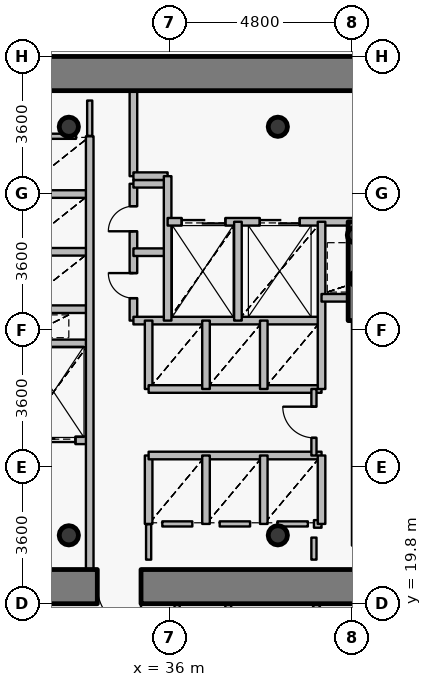
"""IFC4 building model, lengths in metres.
Left out: names, types, materials, properties, quantities, classifications, styles, units other than length and angle.
Written with IfcOpenShell. Run it as: python <this file> out.ifc"""

import sys

from ifc_helpers import new_model, si_unit, direction, frame, frame_2d, origin, origin_2d, place, context, subcontext, project, spatial, rectangle, hollow_circle, extrude, source, transform, mapped, element, fill, save


model = new_model("IFC4")
c1 = context("Model", 3, precision=1e-05, world=origin(), true_north=direction((0.0, 1.0)))
c2 = subcontext(c1, "Body", "Model", "MODEL_VIEW")
j1 = project(units=[si_unit("LENGTHUNIT", "METRE"), si_unit("PLANEANGLEUNIT", "RADIAN")], contexts=[c1])
p1 = place(None, origin())
s1 = spatial("IfcSite", under=j1, at=p1, CompositionType="ELEMENT")
p2 = place(p1, origin())
s2 = spatial("IfcBuilding", under=s1, at=p2, CompositionType="ELEMENT")
p3 = place(p2, frame((0.0, 0.0, 18.6)))
s3 = spatial("IfcBuildingStorey", under=s2, at=p3, CompositionType="ELEMENT", Elevation=18.6)
for number, where, z_axis, x_axis in (
    (1, (33.35, 21.6, 0.0), (0.0, 0.0, 1.0), (1.0, 0.0, 0.0)),
    (2, (38.85, 21.6, 0.0), (0.0, 0.0, 1.0), (1.0, 0.0, 0.0)),
    (3, (38.85, 32.35, 0.0), (0.0, 0.0, 1.0), (1.0, 0.0, 0.0)),
    (4, (33.35, 32.35, 0.0), (0.0, 0.0, 1.0), (1.0, 0.0, 0.0)),
):
    element("IfcColumn", number, at=place(p3, frame(where, z_axis=z_axis, x_axis=x_axis)), inside=s3, PredefinedType="COLUMN", context=c2, shape_type="SweptSolid", body=[
        extrude(hollow_circle(Radius=0.254, WallThickness=0.02, at=origin_2d()), origin(), (0.0, 0.0, 1.0), 4.2),
    ])
for number, where, z_axis, x_axis in (
    (5, (40.95, 28.35, 0.0), (0.0, 0.0, 1.0), (1.0, 0.0, 0.0)),
    (6, (40.88, 29.5, 0.0), (0.0, 0.0, 1.0), (1.0, 0.0, 0.0)),
):
    element("IfcColumn", number, at=place(p3, frame(where, z_axis=z_axis, x_axis=x_axis)), inside=s3, PredefinedType="COLUMN", context=c2, shape_type="SweptSolid", body=[
        extrude(hollow_circle(Radius=0.203, WallThickness=0.016, at=origin_2d()), origin(), (0.0, 0.0, 1.0), 4.2),
    ])
p4 = place(p3, frame((26.75, 33.75, 0.0), z_axis=(0.0, 0.0, 1.0), x_axis=(1.0, 0.0, 0.0)))
e7 = element("IfcWall", 7, at=p4, inside=s3, PredefinedType="SHEAR", context=c2, shape_type="SweptSolid", body=[
    extrude(rectangle(XDim=18.5, YDim=0.9, at=frame_2d((9.25, 0.0))), origin(), (0.0, 0.0, 1.0), 3.35),
])
p5 = place(p3, frame((45.25, 20.25, 0.0), z_axis=(0.0, 0.0, 1.0), x_axis=(-1.0, 0.0, 0.0)))
e8 = element("IfcWall", 8, at=p5, inside=s3, PredefinedType="SHEAR", context=c2, shape_type="SweptSolid", body=[
    extrude(rectangle(XDim=18.5, YDim=0.9, at=frame_2d((9.25, 0.0))), origin(), (0.0, 0.0, 1.0), 3.35),
])
p6 = place(p5, frame((10.0, 0.0, 0.0)))
e9 = element("IfcOpeningElement", 9, at=p6, cuts=e8, PredefinedType="OPENING", context=c2, shape_type="SweptSolid", body=[
    extrude(rectangle(XDim=1.15, YDim=2.15, at=origin_2d()), frame((0.575, 0.46, 1.075), z_axis=(0.0, -1.0, 0.0), x_axis=(1.0, 0.0, 0.0)), (0.0, 0.0, 1.0), 0.92),
])
p7 = place(p3, frame((40.9, 27.25, 0.0), z_axis=(0.0, 0.0, 1.0), x_axis=(0.0, 1.0, 0.0)))
e10 = element("IfcWall", 10, at=p7, inside=s3, PredefinedType="SHEAR", context=c2, shape_type="SweptSolid", body=[
    extrude(rectangle(XDim=2.6, YDim=0.4, at=frame_2d((1.3, 0.0))), origin(), (0.0, 0.0, 1.0), 3.5),
])
p8 = place(p3, frame((32.0, 24.1, 0.0), z_axis=(0.0, 0.0, 1.0), x_axis=(1.0, 0.0, 0.0)))
e11 = element("IfcWall", 11, at=p8, inside=s3, PredefinedType="PARTITIONING", context=c2, shape_type="SweptSolid", body=[
    extrude(rectangle(XDim=1.9, YDim=0.2, at=frame_2d((0.95, 0.0))), origin(), (0.0, 0.0, 1.0), 3.485),
])
p9 = place(p8, frame((0.375, 0.0, 0.0)))
e12 = element("IfcOpeningElement", 12, at=p9, cuts=e11, PredefinedType="OPENING", context=c2, shape_type="SweptSolid", body=[
    extrude(rectangle(XDim=1.15, YDim=2.15, at=origin_2d()), frame((0.575, 0.11, 1.075), z_axis=(0.0, -1.0, 0.0), x_axis=(1.0, 0.0, 0.0)), (0.0, 0.0, 1.0), 0.22),
])
for number, where, z_axis, x_axis in (
    (13, (32.0, 26.65, 0.0), (0.0, 0.0, 1.0), (1.0, 0.0, 0.0)),
    (14, (32.0, 27.55, 0.0), (0.0, 0.0, 1.0), (1.0, 0.0, 0.0)),
    (15, (32.0, 29.06, 0.0), (0.0, 0.0, 1.0), (1.0, 0.0, 0.0)),
    (16, (32.0, 30.58, 0.0), (0.0, 0.0, 1.0), (1.0, 0.0, 0.0)),
):
    element("IfcWall", number, at=place(p3, frame(where, z_axis=z_axis, x_axis=x_axis)), inside=s3, PredefinedType="PARTITIONING", context=c2, shape_type="SweptSolid", body=[
        extrude(rectangle(XDim=1.9, YDim=0.2, at=frame_2d((0.95, 0.0))), origin(), (0.0, 0.0, 1.0), 3.485),
    ])
p10 = place(p3, frame((33.9, 20.7, 0.0), z_axis=(0.0, 0.0, 1.0), x_axis=(0.0, 1.0, 0.0)))
e17 = element("IfcWall", 17, at=p10, inside=s3, PredefinedType="PARTITIONING", context=c2, shape_type="SweptSolid", body=[
    extrude(rectangle(XDim=11.4, YDim=0.2, at=frame_2d((5.7, 0.0))), origin(), (0.0, 0.0, 1.0), 3.485),
])
p11 = place(p3, frame((35.05, 27.25, 0.0), z_axis=(0.0, 0.0, 1.0), x_axis=(0.0, 1.0, 0.0)))
e18 = element("IfcWall", 18, at=p11, inside=s3, PredefinedType="PARTITIONING", context=c2, shape_type="SweptSolid", body=[
    extrude(rectangle(XDim=3.6, YDim=0.2, at=frame_2d((1.8, 0.0))), origin(), (0.0, 0.0, 1.0), 3.9),
])
p12 = place(p11, frame((0.59, 0.0, 0.0)))
e19 = element("IfcOpeningElement", 19, at=p12, cuts=e18, PredefinedType="OPENING", context=c2, shape_type="SweptSolid", body=[
    extrude(rectangle(XDim=0.66, YDim=2.05, at=origin_2d()), frame((0.33, 0.11, 1.025), z_axis=(0.0, -1.0, 0.0), x_axis=(1.0, 0.0, 0.0)), (0.0, 0.0, 1.0), 0.22),
])
p13 = place(p11, frame((2.35, 0.0, 0.0)))
e20 = element("IfcOpeningElement", 20, at=p13, cuts=e18, PredefinedType="OPENING", context=c2, shape_type="SweptSolid", body=[
    extrude(rectangle(XDim=0.66, YDim=2.05, at=origin_2d()), frame((0.33, 0.11, 1.025), z_axis=(0.0, -1.0, 0.0), x_axis=(1.0, 0.0, 0.0)), (0.0, 0.0, 1.0), 0.22),
])
p14 = place(p3, frame((35.05, 27.25, 0.0), z_axis=(0.0, 0.0, 1.0), x_axis=(1.0, 0.0, 0.0)))
e21 = element("IfcWall", 21, at=p14, inside=s3, PredefinedType="PARTITIONING", context=c2, shape_type="SweptSolid", body=[
    extrude(rectangle(XDim=4.95, YDim=0.2, at=frame_2d((2.475, 0.0))), origin(), (0.0, 0.0, 1.0), 3.485),
])
for number, where, z_axis, x_axis in (
    (22, (35.05, 29.05, 0.0), (0.0, 0.0, 1.0), (1.0, 0.0, 0.0)),
    (23, (35.05, 30.85, 0.0), (0.0, 0.0, 1.0), (1.0, 0.0, 0.0)),
):
    element("IfcWall", number, at=place(p3, frame(where, z_axis=z_axis, x_axis=x_axis)), inside=s3, PredefinedType="PARTITIONING", context=c2, shape_type="SweptSolid", body=[
        extrude(rectangle(XDim=0.9, YDim=0.2, at=frame_2d((0.45, 0.0))), origin(), (0.0, 0.0, 1.0), 3.9),
    ])
p15 = place(p3, frame((35.05, 31.05, 0.0), z_axis=(0.0, 0.0, 1.0), x_axis=(0.0, 1.0, 0.0)))
e24 = element("IfcWall", 24, at=p15, inside=s3, PredefinedType="PARTITIONING", context=c2, shape_type="SweptSolid", body=[
    extrude(rectangle(XDim=2.25, YDim=0.2, at=frame_2d((1.125, 0.0))), origin(), (0.0, 0.0, 1.0), 3.485),
])
p16 = place(p3, frame((35.05, 31.05, 0.0), z_axis=(0.0, 0.0, 1.0), x_axis=(1.0, 0.0, 0.0)))
e25 = element("IfcWall", 25, at=p16, inside=s3, PredefinedType="PARTITIONING", context=c2, shape_type="SweptSolid", body=[
    extrude(rectangle(XDim=0.9, YDim=0.2, at=frame_2d((0.45, 0.0))), origin(), (0.0, 0.0, 1.0), 3.9),
])
p17 = place(p3, frame((35.45, 21.9, 0.0), z_axis=(0.0, 0.0, 1.0), x_axis=(0.0, 1.0, 0.0)))
e26 = element("IfcWall", 26, at=p17, inside=s3, PredefinedType="PARTITIONING", context=c2, shape_type="SweptSolid", body=[
    extrude(rectangle(XDim=1.8, YDim=0.2, at=frame_2d((0.9, 0.0))), origin(), (0.0, 0.0, 1.0), 3.9),
])
p18 = place(p3, frame((35.45, 23.7, 0.0), z_axis=(0.0, 0.0, 1.0), x_axis=(1.0, 0.0, 0.0)))
e27 = element("IfcWall", 27, at=p18, inside=s3, PredefinedType="PARTITIONING", context=c2, shape_type="SweptSolid", body=[
    extrude(rectangle(XDim=4.55, YDim=0.2, at=frame_2d((2.275, 0.0))), origin(), (0.0, 0.0, 1.0), 3.485),
])
p19 = place(p3, frame((35.45, 25.45, 0.0), z_axis=(0.0, 0.0, 1.0), x_axis=(0.0, 1.0, 0.0)))
e28 = element("IfcWall", 28, at=p19, inside=s3, PredefinedType="PARTITIONING", context=c2, shape_type="SweptSolid", body=[
    extrude(rectangle(XDim=1.8, YDim=0.2, at=frame_2d((0.9, 0.0))), origin(), (0.0, 0.0, 1.0), 3.9),
])
p20 = place(p3, frame((35.45, 25.45, 0.0), z_axis=(0.0, 0.0, 1.0), x_axis=(1.0, 0.0, 0.0)))
e29 = element("IfcWall", 29, at=p20, inside=s3, PredefinedType="PARTITIONING", context=c2, shape_type="SweptSolid", body=[
    extrude(rectangle(XDim=4.55, YDim=0.2, at=frame_2d((2.275, 0.0))), origin(), (0.0, 0.0, 1.0), 3.485),
])
p21 = place(p3, frame((35.95, 27.25, 0.0), z_axis=(0.0, 0.0, 1.0), x_axis=(0.0, 1.0, 0.0)))
e30 = element("IfcWall", 30, at=p21, inside=s3, PredefinedType="PARTITIONING", context=c2, shape_type="SweptSolid", body=[
    extrude(rectangle(XDim=3.8, YDim=0.2, at=frame_2d((1.9, 0.0))), origin(), (0.0, 0.0, 1.0), 3.9),
])
p22 = place(p3, frame((35.95, 29.85, 0.0), z_axis=(0.0, 0.0, 1.0), x_axis=(1.0, 0.0, 0.0)))
e31 = element("IfcWall", 31, at=p22, inside=s3, PredefinedType="PARTITIONING", context=c2, shape_type="SweptSolid", body=[
    extrude(rectangle(XDim=8.49, YDim=0.2, at=frame_2d((4.245, 0.0))), origin(), (0.0, 0.0, 1.0), 3.485),
])
p23 = place(p22, frame((6.1, 0.0, 0.0)))
e32 = element("IfcOpeningElement", 32, at=p23, cuts=e31, PredefinedType="OPENING", context=c2, shape_type="SweptSolid", body=[
    extrude(rectangle(XDim=1.2, YDim=2.15, at=origin_2d()), frame((0.6, 0.11, 1.075), z_axis=(0.0, -1.0, 0.0), x_axis=(1.0, 0.0, 0.0)), (0.0, 0.0, 1.0), 0.22),
])
p24 = place(p22, frame((0.37, 0.0, 0.0)))
e33 = element("IfcOpeningElement", 33, at=p24, cuts=e31, PredefinedType="OPENING", context=c2, shape_type="SweptSolid", body=[
    extrude(rectangle(XDim=1.15, YDim=2.15, at=origin_2d()), frame((0.575, 0.11, 1.075), z_axis=(0.0, -1.0, 0.0), x_axis=(1.0, 0.0, 0.0)), (0.0, 0.0, 1.0), 0.22),
])
p25 = place(p22, frame((2.425, 0.0, 0.0)))
e34 = element("IfcOpeningElement", 34, at=p25, cuts=e31, PredefinedType="OPENING", context=c2, shape_type="SweptSolid", body=[
    extrude(rectangle(XDim=1.05, YDim=2.15, at=origin_2d()), frame((0.525, 0.11, 1.075), z_axis=(0.0, -1.0, 0.0), x_axis=(1.0, 0.0, 0.0)), (0.0, 0.0, 1.0), 0.22),
])
p26 = place(p3, frame((36.2, 17.9, 0.0), z_axis=(0.0, 0.0, 1.0), x_axis=(0.0, 1.0, 0.0)))
e35 = element("IfcWall", 35, at=p26, inside=s3, PredefinedType="PARTITIONING", context=c2, shape_type="SweptSolid", body=[
    extrude(rectangle(XDim=1.9, YDim=0.135, at=frame_2d((0.95, 0.0))), origin(), (0.0, 0.0, 1.0), 3.085),
])
p27 = place(p26, frame((0.425, 0.0, 0.0)))
e36 = element("IfcOpeningElement", 36, at=p27, cuts=e35, PredefinedType="OPENING", context=c2, shape_type="SweptSolid", body=[
    extrude(rectangle(XDim=1.05, YDim=2.15, at=origin_2d()), frame((0.525, 0.078, 1.075), z_axis=(0.0, -1.0, 0.0), x_axis=(1.0, 0.0, 0.0)), (0.0, 0.0, 1.0), 0.155),
])
for number, where, z_axis, x_axis in (
    (37, (36.96, 21.9, 0.0), (0.0, 0.0, 1.0), (0.0, 1.0, 0.0)),
    (38, (36.96, 25.45, 0.0), (0.0, 0.0, 1.0), (0.0, 1.0, 0.0)),
):
    element("IfcWall", number, at=place(p3, frame(where, z_axis=z_axis, x_axis=x_axis)), inside=s3, PredefinedType="PARTITIONING", context=c2, shape_type="SweptSolid", body=[
        extrude(rectangle(XDim=1.8, YDim=0.2, at=frame_2d((0.9, 0.0))), origin(), (0.0, 0.0, 1.0), 3.9),
    ])
p28 = place(p3, frame((37.531, 19.8, 0.0), z_axis=(0.0, 0.0, 1.0), x_axis=(0.207904603096, -0.978149107249, 0.0)))
e39 = element("IfcWall", 39, at=p28, inside=s3, PredefinedType="PARTITIONING", context=c2, shape_type="SweptSolid", body=[
    extrude(rectangle(XDim=18.724, YDim=0.15, at=frame_2d((9.362, 0.0))), origin(), (0.0, 0.0, 1.0), 3.285),
])
p29 = place(p28, frame((8.837, 0.0, 0.0)))
e40 = element("IfcOpeningElement", 40, at=p29, cuts=e39, PredefinedType="OPENING", context=c2, shape_type="SweptSolid", body=[
    extrude(rectangle(XDim=1.05, YDim=2.15, at=origin_2d()), frame((0.525, 0.085, 1.075), z_axis=(0.0, -1.0, 0.0), x_axis=(1.0, 0.0, 0.0)), (0.0, 0.0, 1.0), 0.17),
])
p30 = place(p3, frame((37.8, 27.25, 0.0), z_axis=(0.0, 0.0, 1.0), x_axis=(0.0, 1.0, 0.0)))
e41 = element("IfcWall", 41, at=p30, inside=s3, PredefinedType="PARTITIONING", context=c2, shape_type="SweptSolid", body=[
    extrude(rectangle(XDim=2.6, YDim=0.2, at=frame_2d((1.3, 0.0))), origin(), (0.0, 0.0, 1.0), 3.9),
])
for number, where, z_axis, x_axis in (
    (42, (38.48, 21.9, 0.0), (0.0, 0.0, 1.0), (0.0, 1.0, 0.0)),
    (43, (38.48, 25.45, 0.0), (0.0, 0.0, 1.0), (0.0, 1.0, 0.0)),
):
    element("IfcWall", number, at=place(p3, frame(where, z_axis=z_axis, x_axis=x_axis)), inside=s3, PredefinedType="PARTITIONING", context=c2, shape_type="SweptSolid", body=[
        extrude(rectangle(XDim=1.8, YDim=0.2, at=frame_2d((0.9, 0.0))), origin(), (0.0, 0.0, 1.0), 3.9),
    ])
p31 = place(p3, frame((39.8, 21.9, 0.0), z_axis=(0.0, 0.0, 1.0), x_axis=(1.0, 0.0, 0.0)))
e44 = element("IfcWall", 44, at=p31, inside=s3, PredefinedType="PARTITIONING", context=c2, shape_type="SweptSolid", body=[
    extrude(rectangle(XDim=0.2, YDim=0.2, at=frame_2d((0.1, 0.0))), origin(), (0.0, 0.0, 1.0), 3.9),
])
p32 = place(p3, frame((39.8, 23.7, 0.0), z_axis=(0.0, 0.0, 1.0), x_axis=(0.0, 1.0, 0.0)))
e45 = element("IfcWall", 45, at=p32, inside=s3, PredefinedType="PARTITIONING", context=c2, shape_type="SweptSolid", body=[
    extrude(rectangle(XDim=1.75, YDim=0.135, at=frame_2d((0.875, 0.0))), origin(), (0.0, 0.0, 1.0), 3.9),
])
p33 = place(p32, frame((0.465, 0.0, 0.0)))
e46 = element("IfcOpeningElement", 46, at=p33, cuts=e45, PredefinedType="OPENING", context=c2, shape_type="SweptSolid", body=[
    extrude(rectangle(XDim=0.82, YDim=2.1, at=origin_2d()), frame((0.41, 0.078, 1.05), z_axis=(0.0, -1.0, 0.0), x_axis=(1.0, 0.0, 0.0)), (0.0, 0.0, 1.0), 0.155),
])
p34 = place(p3, frame((39.828, 19.8, 0.0), z_axis=(0.0, 0.0, 1.0), x_axis=(0.469463695446, -0.882951775953, 0.0)))
e47 = element("IfcWall", 47, at=p34, inside=s3, PredefinedType="PARTITIONING", context=c2, shape_type="SweptSolid", body=[
    extrude(rectangle(XDim=18.824, YDim=0.15, at=frame_2d((9.412, 0.0))), origin(), (0.0, 0.0, 1.0), 3.285),
])
p35 = place(p3, frame((40.0, 21.9, 0.0), z_axis=(0.0, 0.0, 1.0), x_axis=(0.0, 1.0, 0.0)))
e48 = element("IfcWall", 48, at=p35, inside=s3, PredefinedType="PARTITIONING", context=c2, shape_type="SweptSolid", body=[
    extrude(rectangle(XDim=1.8, YDim=0.2, at=frame_2d((0.9, 0.0))), origin(), (0.0, 0.0, 1.0), 3.9),
])
p36 = place(p3, frame((40.0, 25.45, 0.0), z_axis=(0.0, 0.0, 1.0), x_axis=(0.0, 1.0, 0.0)))
e49 = element("IfcWall", 49, at=p36, inside=s3, PredefinedType="PARTITIONING", context=c2, shape_type="SweptSolid", body=[
    extrude(rectangle(XDim=4.4, YDim=0.2, at=frame_2d((2.2, 0.0))), origin(), (0.0, 0.0, 1.0), 3.9),
])
p37 = place(p3, frame((40.0, 27.85, 0.0), z_axis=(0.0, 0.0, 1.0), x_axis=(1.0, 0.0, 0.0)))
e50 = element("IfcWall", 50, at=p37, inside=s3, PredefinedType="PARTITIONING", context=c2, shape_type="SweptSolid", body=[
    extrude(rectangle(XDim=0.9, YDim=0.2, at=frame_2d((0.45, 0.0))), origin(), (0.0, 0.0, 1.0), 3.9),
])
p38 = place(p3, frame((40.9, 21.33, 0.0), z_axis=(0.0, 0.0, 1.0), x_axis=(0.0, 1.0, 0.0)))
e51 = element("IfcWall", 51, at=p38, inside=s3, PredefinedType="PARTITIONING", context=c2, shape_type="SweptSolid", body=[
    extrude(rectangle(XDim=5.91, YDim=0.2, at=frame_2d((2.955, 0.0))), origin(), (0.0, 0.0, 1.0), 3.435),
])
p39 = place(p3, frame((36.6, 21.9, 0.0), z_axis=(0.0, 0.0, 1.0), x_axis=(-1.0, 0.0, 0.0)))
e52 = element("IfcWall", 52, at=p39, inside=s3, PredefinedType="PARTITIONING", context=c2, shape_type="SweptSolid", body=[
    extrude(rectangle(XDim=0.79, YDim=0.135, at=frame_2d((0.395, 0.0))), origin(), (0.0, 0.0, 1.0), 3.9),
])
p40 = place(p3, frame((38.12, 21.9, 0.0), z_axis=(0.0, 0.0, 1.0), x_axis=(-1.0, 0.0, 0.0)))
e53 = element("IfcWall", 53, at=p40, inside=s3, PredefinedType="PARTITIONING", context=c2, shape_type="SweptSolid", body=[
    extrude(rectangle(XDim=0.8, YDim=0.135, at=frame_2d((0.4, 0.0))), origin(), (0.0, 0.0, 1.0), 3.9),
])
p41 = place(p3, frame((39.64, 21.9, 0.0), z_axis=(0.0, 0.0, 1.0), x_axis=(-1.0, 0.0, 0.0)))
e54 = element("IfcWall", 54, at=p41, inside=s3, PredefinedType="PARTITIONING", context=c2, shape_type="SweptSolid", body=[
    extrude(rectangle(XDim=0.8, YDim=0.135, at=frame_2d((0.4, 0.0))), origin(), (0.0, 0.0, 1.0), 3.485),
])
p42 = place(p3, frame((32.36, 32.1, 0.0), z_axis=(0.0, 0.0, 1.0), x_axis=(1.0, 0.0, 0.0)))
e55 = element("IfcWall", 55, at=p42, inside=s3, PredefinedType="PARTITIONING", context=c2, shape_type="SweptSolid", body=[
    extrude(rectangle(XDim=1.18, YDim=0.135, at=frame_2d((0.59, 0.0))), origin(), (0.0, 0.0, 1.0), 3.485),
])
p43 = place(p3, frame((39.8, 20.96, 0.0), z_axis=(0.0, 0.0, 1.0), x_axis=(0.0, 1.0, 0.0)))
e56 = element("IfcWall", 56, at=p43, inside=s3, PredefinedType="PARTITIONING", context=c2, shape_type="SweptSolid", body=[
    extrude(rectangle(XDim=0.58, YDim=0.135, at=frame_2d((0.29, 0.0))), origin(), (0.0, 0.0, 1.0), 3.435),
])
for number, where, z_axis, x_axis in (
    (57, (35.45, 21.89, 0.0), (0.0, 0.0, 1.0), (0.0, -1.0, 0.0)),
    (58, (33.9, 32.11, 0.0), (0.0, 0.0, 1.0), (0.0, 1.0, 0.0)),
):
    element("IfcWall", number, at=place(p3, frame(where, z_axis=z_axis, x_axis=x_axis)), inside=s3, PredefinedType="PARTITIONING", context=c2, shape_type="SweptSolid", body=[
        extrude(rectangle(XDim=0.93, YDim=0.135, at=frame_2d((0.465, 0.0))), origin(), (0.0, 0.0, 1.0), 3.485),
    ])
m1 = source(origin(), c2, "Body", "SweptSolid", [
    extrude(rectangle(XDim=1.15, YDim=2.15, at=origin_2d()), frame((0.575, 0.025, 1.075), z_axis=(0.0, -1.0, 0.0), x_axis=(1.0, 0.0, 0.0)), (0.0, 0.0, 1.0), 0.05),
])
p44 = place(p6, origin())
e59 = element("IfcDoor", 59, at=p44, inside=s3, OperationType="SINGLE_SWING_LEFT", PredefinedType="DOOR", context=c2, shape_type="MappedRepresentation", body=[
    mapped(m1, transform((0.0, 0.0, 0.0), x_axis=(1.0, 0.0, 0.0), y_axis=(0.0, 1.0, 0.0), z_axis=(0.0, 0.0, 1.0), scale=1.0)),
])
fill(e9, e59)
m2 = source(origin(), c2, "Body", "SweptSolid", [
    extrude(rectangle(XDim=1.15, YDim=2.15, at=origin_2d()), frame((0.575, 0.025, 1.075), z_axis=(0.0, -1.0, 0.0), x_axis=(1.0, 0.0, 0.0)), (0.0, 0.0, 1.0), 0.05),
])
p45 = place(p24, origin())
e60 = element("IfcDoor", 60, at=p45, inside=s3, OperationType="DOUBLE_DOOR_SLIDING", PredefinedType="USERDEFINED", context=c2, shape_type="MappedRepresentation", body=[
    mapped(m2, transform((0.0, 0.0, 0.0), x_axis=(1.0, 0.0, 0.0), y_axis=(0.0, 1.0, 0.0), z_axis=(0.0, 0.0, 1.0), scale=1.0)),
])
fill(e33, e60)
p46 = place(p9, origin())
e61 = element("IfcDoor", 61, at=p46, inside=s3, OperationType="DOUBLE_DOOR_SLIDING", PredefinedType="USERDEFINED", context=c2, shape_type="MappedRepresentation", body=[
    mapped(m2, transform((0.0, 0.0, 0.0), x_axis=(1.0, 0.0, 0.0), y_axis=(0.0, 1.0, 0.0), z_axis=(0.0, 0.0, 1.0), scale=1.0)),
])
fill(e12, e61)
m3 = source(origin(), c2, "Body", "SweptSolid", [
    extrude(rectangle(XDim=1.05, YDim=2.15, at=origin_2d()), frame((0.525, 0.025, 1.075), z_axis=(0.0, -1.0, 0.0), x_axis=(1.0, 0.0, 0.0)), (0.0, 0.0, 1.0), 0.05),
])
p47 = place(p25, origin())
e62 = element("IfcDoor", 62, at=p47, inside=s3, OperationType="DOUBLE_DOOR_SLIDING", PredefinedType="USERDEFINED", context=c2, shape_type="MappedRepresentation", body=[
    mapped(m3, transform((0.0, 0.0, 0.0), x_axis=(1.0, 0.0, 0.0), y_axis=(0.0, 1.0, 0.0), z_axis=(0.0, 0.0, 1.0), scale=1.0)),
])
fill(e34, e62)
m4 = source(origin(), c2, "Body", "SweptSolid", [
    extrude(rectangle(XDim=0.66, YDim=2.05, at=origin_2d()), frame((0.33, 0.025, 1.025), z_axis=(0.0, -1.0, 0.0), x_axis=(1.0, 0.0, 0.0)), (0.0, 0.0, 1.0), 0.05),
])
p48 = place(p12, origin())
e63 = element("IfcDoor", 63, at=p48, inside=s3, OperationType="SINGLE_SWING_RIGHT", PredefinedType="USERDEFINED", context=c2, shape_type="MappedRepresentation", body=[
    mapped(m4, transform((0.0, 0.0, 0.0), x_axis=(1.0, 0.0, 0.0), y_axis=(0.0, 1.0, 0.0), z_axis=(0.0, 0.0, 1.0), scale=1.0)),
])
fill(e19, e63)
p49 = place(p13, origin())
e64 = element("IfcDoor", 64, at=p49, inside=s3, OperationType="SINGLE_SWING_LEFT", PredefinedType="USERDEFINED", context=c2, shape_type="MappedRepresentation", body=[
    mapped(m4, transform((0.0, 0.0, 0.0), x_axis=(1.0, 0.0, 0.0), y_axis=(0.0, 1.0, 0.0), z_axis=(0.0, 0.0, 1.0), scale=1.0)),
])
fill(e20, e64)
m5 = source(origin(), c2, "Body", "SweptSolid", [
    extrude(rectangle(XDim=0.82, YDim=2.1, at=origin_2d()), frame((0.41, 0.025, 1.05), z_axis=(0.0, -1.0, 0.0), x_axis=(1.0, 0.0, 0.0)), (0.0, 0.0, 1.0), 0.05),
])
p50 = place(p33, origin())
e65 = element("IfcDoor", 65, at=p50, inside=s3, OperationType="SINGLE_SWING_RIGHT", PredefinedType="DOOR", context=c2, shape_type="MappedRepresentation", body=[
    mapped(m5, transform((0.0, 0.0, 0.0), x_axis=(1.0, 0.0, 0.0), y_axis=(0.0, 1.0, 0.0), z_axis=(0.0, 0.0, 1.0), scale=1.0)),
])
fill(e46, e65)
save(model, sys.argv[1])
